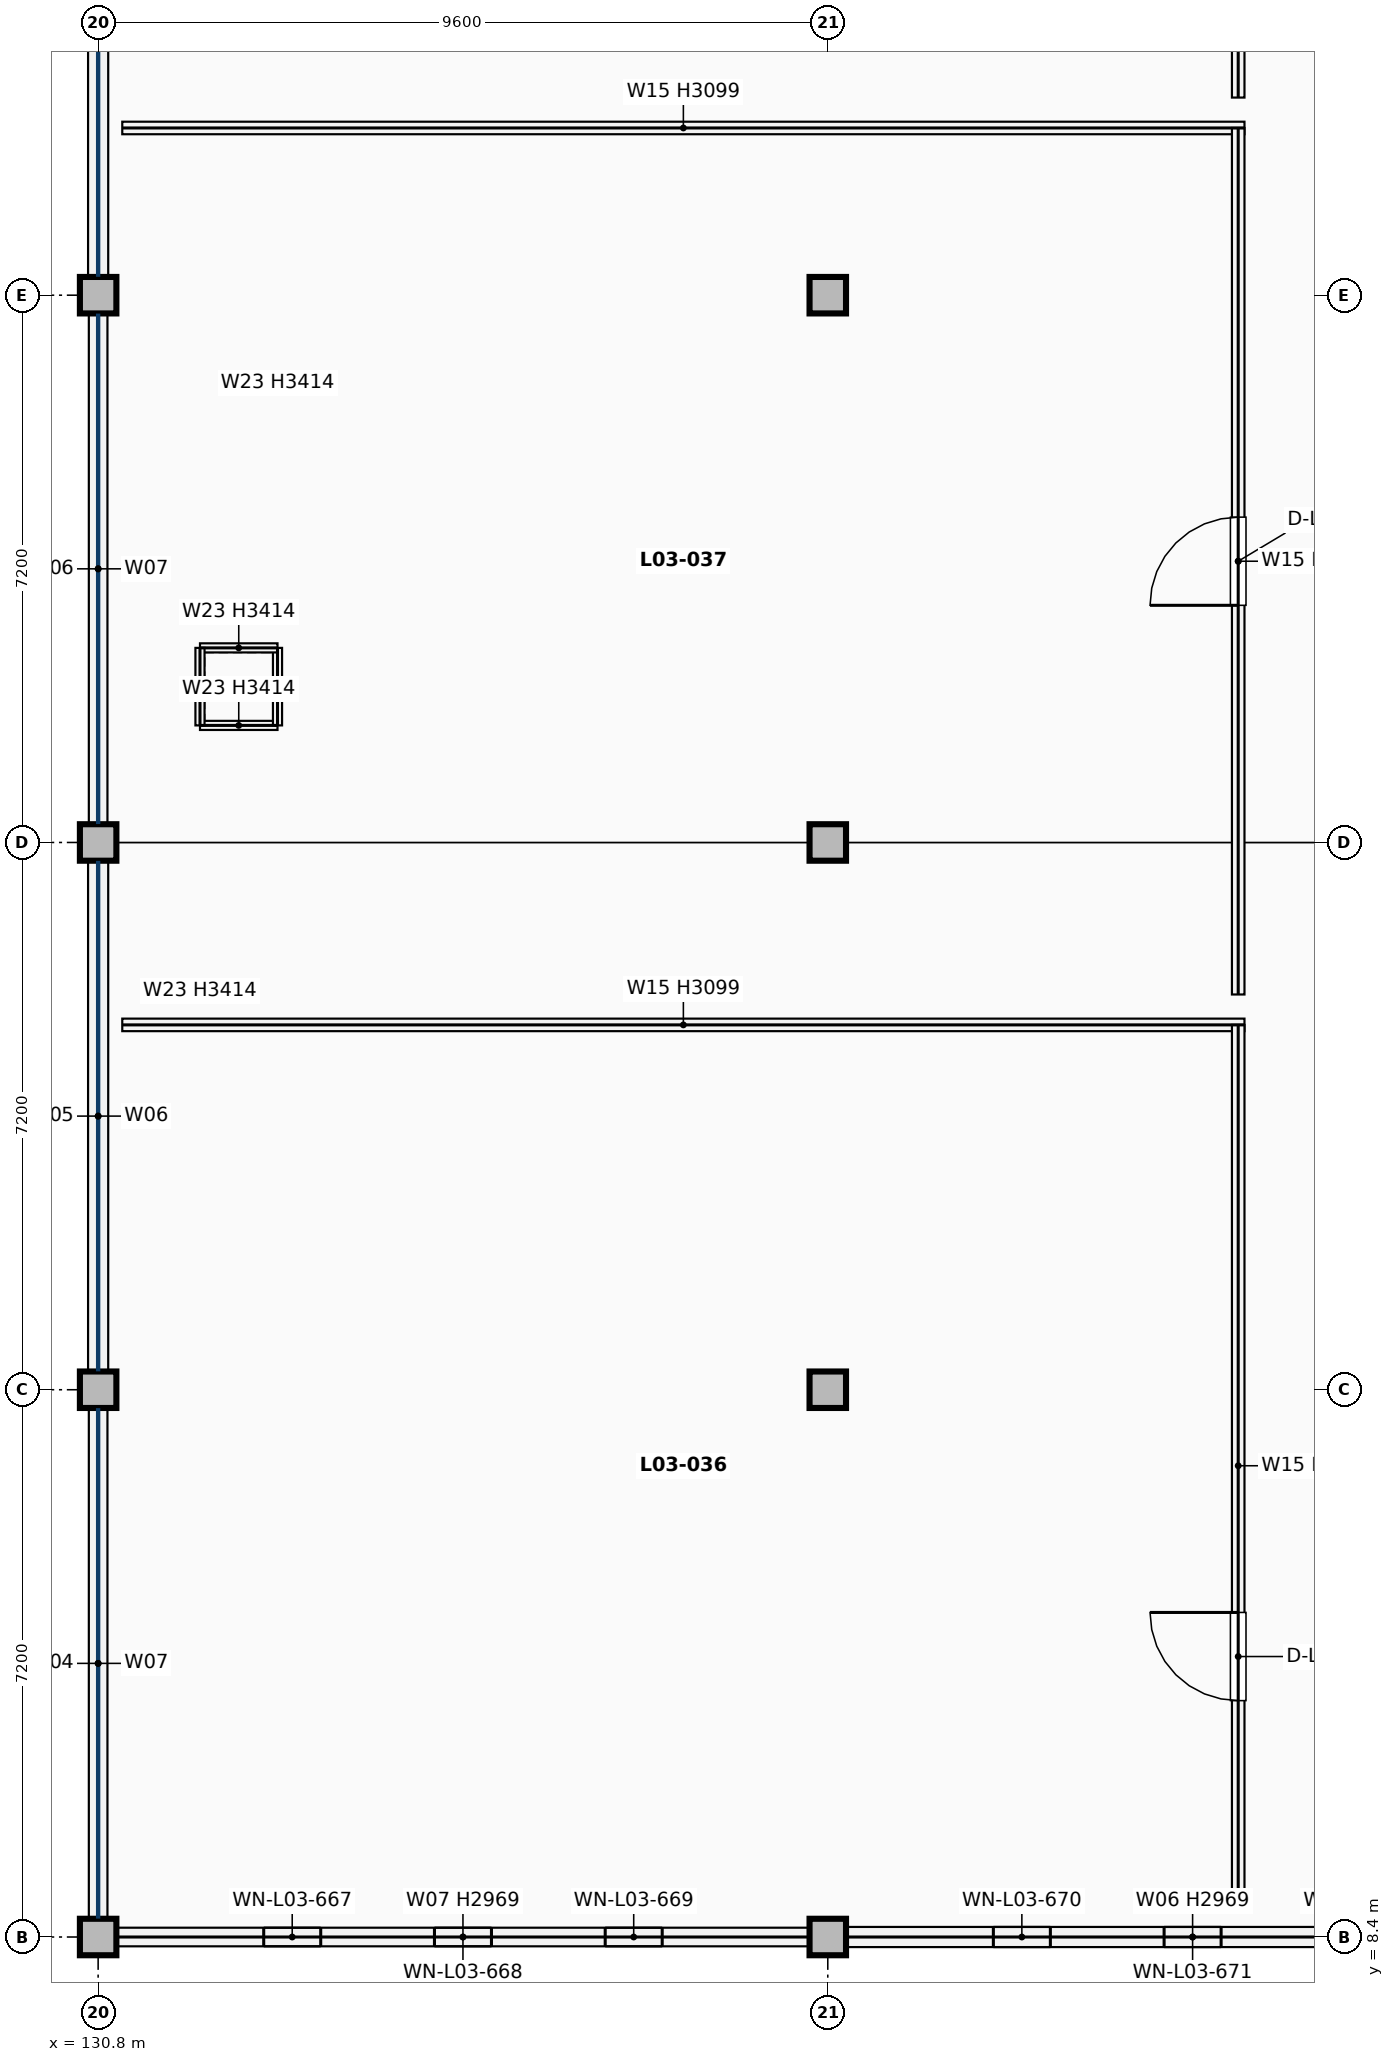
"""IFC4 building model, lengths in metres.
Left out: names, types, materials, properties, quantities, classifications, styles, units other than length and angle.
Written with IfcOpenShell. Run it as: python <this file> out.ifc"""

import sys

from ifc_helpers import new_model, si_unit, direction, frame, frame_2d, origin, origin_2d, place, context, subcontext, project, spatial, rectangle, extrude, element, fill, save


model = new_model("IFC4")
c1 = context("Model", 3, precision=1e-05, world=origin(), true_north=direction((0.0, 1.0)))
c2 = subcontext(c1, "Body", "Model", "MODEL_VIEW")
j1 = project(units=[si_unit("LENGTHUNIT", "METRE"), si_unit("PLANEANGLEUNIT", "RADIAN")], contexts=[c1])
p1 = place(None, origin())
s1 = spatial("IfcSite", under=j1, at=p1, CompositionType="ELEMENT")
p2 = place(p1, origin())
s2 = spatial("IfcBuilding", under=s1, at=p2, CompositionType="ELEMENT")
p3 = place(p2, frame((0.0, 0.0, 13.6)))
s3 = spatial("IfcBuildingStorey", under=s2, at=p3, CompositionType="ELEMENT", Elevation=13.6)
for number, where, z_axis, x_axis in (
    (1, (130.8, 8.4, 0.0), (0.0, 0.0, 1.0), (1.0, 0.0, 0.0)),
    (2, (130.8, 15.6, 0.0), (0.0, 0.0, 1.0), (1.0, 0.0, 0.0)),
    (3, (130.8, 22.8, 0.0), (0.0, 0.0, 1.0), (1.0, 0.0, 0.0)),
    (4, (130.8, 30.0, 0.0), (0.0, 0.0, 1.0), (1.0, 0.0, 0.0)),
    (5, (140.4, 8.4, 0.0), (0.0, 0.0, 1.0), (1.0, 0.0, 0.0)),
    (6, (140.4, 15.6, 0.0), (0.0, 0.0, 1.0), (1.0, 0.0, 0.0)),
    (7, (140.4, 22.8, 0.0), (0.0, 0.0, 1.0), (1.0, 0.0, 0.0)),
    (8, (140.4, 30.0, 0.0), (0.0, 0.0, 1.0), (1.0, 0.0, 0.0)),
):
    element("IfcColumn", number, at=place(p3, frame(where, z_axis=z_axis, x_axis=x_axis)), inside=s3, PredefinedType="COLUMN", context=c2, shape_type="SweptSolid", body=[
        extrude(rectangle(XDim=0.48, YDim=0.48, at=origin_2d()), origin(), (0.0, 0.0, 1.0), 3.74),
    ])
p4 = place(p3, frame((130.8, 8.642, 0.0), z_axis=(0.0, 0.0, 1.0), x_axis=(0.0, 1.0, 0.0)))
e9 = element("IfcWall", 9, at=p4, inside=s3, PredefinedType="SOLIDWALL", context=c2, shape_type="SweptSolid", body=[
    extrude(rectangle(XDim=6.716, YDim=0.245, at=frame_2d((3.358, 0.0))), origin(), (0.0, 0.0, 1.0), 0.85),
])
p5 = place(p3, frame((130.8, 15.842, 0.0), z_axis=(0.0, 0.0, 1.0), x_axis=(0.0, 1.0, 0.0)))
e10 = element("IfcWall", 10, at=p5, inside=s3, PredefinedType="SOLIDWALL", context=c2, shape_type="SweptSolid", body=[
    extrude(rectangle(XDim=6.716, YDim=0.265, at=frame_2d((3.358, 0.0))), origin(), (0.0, 0.0, 1.0), 0.85),
])
p6 = place(p3, frame((130.8, 23.042, 0.0), z_axis=(0.0, 0.0, 1.0), x_axis=(0.0, 1.0, 0.0)))
e11 = element("IfcWall", 11, at=p6, inside=s3, PredefinedType="SOLIDWALL", context=c2, shape_type="SweptSolid", body=[
    extrude(rectangle(XDim=6.716, YDim=0.245, at=frame_2d((3.358, 0.0))), origin(), (0.0, 0.0, 1.0), 0.85),
])
p7 = place(p3, frame((130.8, 30.242, 0.0), z_axis=(0.0, 0.0, 1.0), x_axis=(0.0, 1.0, 0.0)))
e12 = element("IfcWall", 12, at=p7, inside=s3, PredefinedType="SOLIDWALL", context=c2, shape_type="SweptSolid", body=[
    extrude(rectangle(XDim=6.716, YDim=0.265, at=frame_2d((3.358, 0.0))), origin(), (0.0, 0.0, 1.0), 0.85),
])
p8 = place(p3, frame((131.042, 8.4, 0.0), z_axis=(0.0, 0.0, 1.0), x_axis=(1.0, 0.0, 0.0)))
e13 = element("IfcWall", 13, at=p8, inside=s3, PredefinedType="SOLIDWALL", context=c2, shape_type="SweptSolid", body=[
    extrude(rectangle(XDim=9.116, YDim=0.245, at=frame_2d((4.558, 0.0))), origin(), (0.0, 0.0, 1.0), 2.969),
])
p9 = place(p8, frame((1.937, 0.0, 0.75)))
e14 = element("IfcOpeningElement", 14, at=p9, cuts=e13, PredefinedType="OPENING", context=c2, shape_type="SweptSolid", body=[
    extrude(rectangle(XDim=0.75, YDim=2.1, at=frame_2d((0.375, 1.05))), frame((0.0, 0.133, 0.0), z_axis=(0.0, -1.0, 0.0), x_axis=(1.0, 0.0, 0.0)), (0.0, 0.0, 1.0), 0.265),
])
p10 = place(p8, frame((4.183, 0.0, 0.75)))
e15 = element("IfcOpeningElement", 15, at=p10, cuts=e13, PredefinedType="OPENING", context=c2, shape_type="SweptSolid", body=[
    extrude(rectangle(XDim=0.75, YDim=2.1, at=frame_2d((0.375, 1.05))), frame((0.0, 0.133, 0.0), z_axis=(0.0, -1.0, 0.0), x_axis=(1.0, 0.0, 0.0)), (0.0, 0.0, 1.0), 0.265),
])
p11 = place(p8, frame((6.429, 0.0, 0.75)))
e16 = element("IfcOpeningElement", 16, at=p11, cuts=e13, PredefinedType="OPENING", context=c2, shape_type="SweptSolid", body=[
    extrude(rectangle(XDim=0.75, YDim=2.1, at=frame_2d((0.375, 1.05))), frame((0.0, 0.133, 0.0), z_axis=(0.0, -1.0, 0.0), x_axis=(1.0, 0.0, 0.0)), (0.0, 0.0, 1.0), 0.265),
])
p12 = place(p3, frame((140.642, 8.4, 0.0), z_axis=(0.0, 0.0, 1.0), x_axis=(1.0, 0.0, 0.0)))
e17 = element("IfcWall", 17, at=p12, inside=s3, PredefinedType="SOLIDWALL", context=c2, shape_type="SweptSolid", body=[
    extrude(rectangle(XDim=9.116, YDim=0.265, at=frame_2d((4.558, 0.0))), origin(), (0.0, 0.0, 1.0), 2.969),
])
p13 = place(p12, frame((1.937, 0.0, 0.75)))
e18 = element("IfcOpeningElement", 18, at=p13, cuts=e17, PredefinedType="OPENING", context=c2, shape_type="SweptSolid", body=[
    extrude(rectangle(XDim=0.75, YDim=1.5, at=frame_2d((0.375, 0.75))), frame((0.0, 0.143, 0.0), z_axis=(0.0, -1.0, 0.0), x_axis=(1.0, 0.0, 0.0)), (0.0, 0.0, 1.0), 0.285),
])
p14 = place(p12, frame((4.183, 0.0, 0.75)))
e19 = element("IfcOpeningElement", 19, at=p14, cuts=e17, PredefinedType="OPENING", context=c2, shape_type="SweptSolid", body=[
    extrude(rectangle(XDim=0.75, YDim=1.5, at=frame_2d((0.375, 0.75))), frame((0.0, 0.143, 0.0), z_axis=(0.0, -1.0, 0.0), x_axis=(1.0, 0.0, 0.0)), (0.0, 0.0, 1.0), 0.285),
])
p15 = place(p12, frame((6.429, 0.0, 0.75)))
e20 = element("IfcOpeningElement", 20, at=p15, cuts=e17, PredefinedType="OPENING", context=c2, shape_type="SweptSolid", body=[
    extrude(rectangle(XDim=0.75, YDim=1.5, at=frame_2d((0.375, 0.75))), frame((0.0, 0.143, 0.0), z_axis=(0.0, -1.0, 0.0), x_axis=(1.0, 0.0, 0.0)), (0.0, 0.0, 1.0), 0.285),
])
for number, where, z_axis, x_axis in (
    (21, (132.14, 24.34, 0.0), (0.0, 0.0, 1.0), (1.0, 0.0, 0.0)),
    (22, (133.16, 24.34, 0.0), (0.0, 0.0, 1.0), (0.0, 1.0, 0.0)),
    (23, (133.16, 25.36, 0.0), (0.0, 0.0, 1.0), (-1.0, 0.0, 0.0)),
    (24, (132.14, 25.36, 0.0), (0.0, 0.0, 1.0), (0.0, -1.0, 0.0)),
):
    element("IfcWall", number, at=place(p3, frame(where, z_axis=z_axis, x_axis=x_axis)), inside=s3, PredefinedType="PARTITIONING", context=c2, shape_type="SweptSolid", body=[
        extrude(rectangle(XDim=1.02, YDim=0.12, at=frame_2d((0.51, 0.0))), origin(), (0.0, 0.0, 1.0), 3.414),
    ])
p16 = place(p3, frame((131.117, 20.4, 0.0), z_axis=(0.0, 0.0, 1.0), x_axis=(1.0, 0.0, 0.0)))
e25 = element("IfcWall", 25, at=p16, inside=s3, PredefinedType="PARTITIONING", context=c2, shape_type="SweptSolid", body=[
    extrude(rectangle(XDim=14.765, YDim=0.165, at=frame_2d((7.383, 0.0))), origin(), (0.0, 0.0, 1.0), 3.099),
])
p17 = place(p3, frame((145.8, 8.8, 0.0), z_axis=(0.0, 0.0, 1.0), x_axis=(0.0, 1.0, 0.0)))
e26 = element("IfcWall", 26, at=p17, inside=s3, PredefinedType="PARTITIONING", context=c2, shape_type="SweptSolid", body=[
    extrude(rectangle(XDim=11.6, YDim=0.165, at=frame_2d((5.8, 0.0))), origin(), (0.0, 0.0, 1.0), 2.809),
])
p18 = place(p17, frame((2.71, 0.0, 0.0)))
e27 = element("IfcOpeningElement", 27, at=p18, cuts=e26, PredefinedType="OPENING", context=c2, shape_type="SweptSolid", body=[
    extrude(rectangle(XDim=1.16, YDim=2.22, at=frame_2d((0.58, 1.11))), frame((0.0, 0.093, 0.0), z_axis=(0.0, -1.0, 0.0), x_axis=(1.0, 0.0, 0.0)), (0.0, 0.0, 1.0), 0.185),
])
p19 = place(p3, frame((131.117, 32.2, 0.0), z_axis=(0.0, 0.0, 1.0), x_axis=(1.0, 0.0, 0.0)))
e28 = element("IfcWall", 28, at=p19, inside=s3, PredefinedType="PARTITIONING", context=c2, shape_type="SweptSolid", body=[
    extrude(rectangle(XDim=14.765, YDim=0.165, at=frame_2d((7.383, 0.0))), origin(), (0.0, 0.0, 1.0), 3.099),
])
p20 = place(p3, frame((145.8, 20.8, 0.0), z_axis=(0.0, 0.0, 1.0), x_axis=(0.0, 1.0, 0.0)))
e29 = element("IfcWall", 29, at=p20, inside=s3, PredefinedType="PARTITIONING", context=c2, shape_type="SweptSolid", body=[
    extrude(rectangle(XDim=11.4, YDim=0.165, at=frame_2d((5.7, 0.0))), origin(), (0.0, 0.0, 1.0), 2.809),
])
p21 = place(p20, frame((5.12, 0.0, 0.0)))
e30 = element("IfcOpeningElement", 30, at=p21, cuts=e29, PredefinedType="OPENING", context=c2, shape_type="SweptSolid", body=[
    extrude(rectangle(XDim=1.16, YDim=2.22, at=frame_2d((0.58, 1.11))), frame((0.0, 0.093, 0.0), z_axis=(0.0, -1.0, 0.0), x_axis=(1.0, 0.0, 0.0)), (0.0, 0.0, 1.0), 0.185),
])
p22 = place(p3, frame((145.8, 32.6, 0.0), z_axis=(0.0, 0.0, 1.0), x_axis=(0.0, 1.0, 0.0)))
e31 = element("IfcWall", 31, at=p22, inside=s3, PredefinedType="PARTITIONING", context=c2, shape_type="SweptSolid", body=[
    extrude(rectangle(XDim=11.4, YDim=0.165, at=frame_2d((5.7, 0.0))), origin(), (0.0, 0.0, 1.0), 2.809),
])
p23 = place(p22, frame((7.58, 0.0, 0.0)))
e32 = element("IfcOpeningElement", 32, at=p23, cuts=e31, PredefinedType="OPENING", context=c2, shape_type="SweptSolid", body=[
    extrude(rectangle(XDim=1.16, YDim=2.22, at=frame_2d((0.58, 1.11))), frame((0.0, 0.093, 0.0), z_axis=(0.0, -1.0, 0.0), x_axis=(1.0, 0.0, 0.0)), (0.0, 0.0, 1.0), 0.185),
])
p24 = place(p9, origin())
e33 = element("IfcWindow", 33, at=p24, inside=s3, PartitioningType="SINGLE_PANEL", PredefinedType="WINDOW", context=c2, shape_type="SweptSolid", body=[
    extrude(rectangle(XDim=0.75, YDim=2.1, at=frame_2d((0.375, 1.05))), frame((0.0, 0.03, 0.0), z_axis=(0.0, -1.0, 0.0), x_axis=(1.0, 0.0, 0.0)), (0.0, 0.0, 1.0), 0.06),
])
fill(e14, e33)
p25 = place(p10, origin())
e34 = element("IfcWindow", 34, at=p25, inside=s3, PartitioningType="SINGLE_PANEL", PredefinedType="WINDOW", context=c2, shape_type="SweptSolid", body=[
    extrude(rectangle(XDim=0.75, YDim=2.1, at=frame_2d((0.375, 1.05))), frame((0.0, 0.03, 0.0), z_axis=(0.0, -1.0, 0.0), x_axis=(1.0, 0.0, 0.0)), (0.0, 0.0, 1.0), 0.06),
])
fill(e15, e34)
p26 = place(p11, origin())
e35 = element("IfcWindow", 35, at=p26, inside=s3, PartitioningType="SINGLE_PANEL", PredefinedType="WINDOW", context=c2, shape_type="SweptSolid", body=[
    extrude(rectangle(XDim=0.75, YDim=2.1, at=frame_2d((0.375, 1.05))), frame((0.0, 0.03, 0.0), z_axis=(0.0, -1.0, 0.0), x_axis=(1.0, 0.0, 0.0)), (0.0, 0.0, 1.0), 0.06),
])
fill(e16, e35)
p27 = place(p13, origin())
e36 = element("IfcWindow", 36, at=p27, inside=s3, PartitioningType="SINGLE_PANEL", PredefinedType="WINDOW", context=c2, shape_type="SweptSolid", body=[
    extrude(rectangle(XDim=0.75, YDim=1.5, at=frame_2d((0.375, 0.75))), frame((0.0, 0.03, 0.0), z_axis=(0.0, -1.0, 0.0), x_axis=(1.0, 0.0, 0.0)), (0.0, 0.0, 1.0), 0.06),
])
fill(e18, e36)
p28 = place(p14, origin())
e37 = element("IfcWindow", 37, at=p28, inside=s3, PartitioningType="SINGLE_PANEL", PredefinedType="WINDOW", context=c2, shape_type="SweptSolid", body=[
    extrude(rectangle(XDim=0.75, YDim=1.5, at=frame_2d((0.375, 0.75))), frame((0.0, 0.03, 0.0), z_axis=(0.0, -1.0, 0.0), x_axis=(1.0, 0.0, 0.0)), (0.0, 0.0, 1.0), 0.06),
])
fill(e19, e37)
p29 = place(p18, origin())
e38 = element("IfcDoor", 38, at=p29, inside=s3, OperationType="SINGLE_SWING_RIGHT", PredefinedType="DOOR", context=c2, shape_type="SweptSolid", body=[
    extrude(rectangle(XDim=1.16, YDim=2.22, at=frame_2d((0.58, 1.11))), frame((0.0, 0.025, 0.0), z_axis=(0.0, -1.0, 0.0), x_axis=(1.0, 0.0, 0.0)), (0.0, 0.0, 1.0), 0.05),
])
fill(e27, e38)
p30 = place(p21, origin())
e39 = element("IfcDoor", 39, at=p30, inside=s3, OperationType="SINGLE_SWING_LEFT", PredefinedType="DOOR", context=c2, shape_type="SweptSolid", body=[
    extrude(rectangle(XDim=1.16, YDim=2.22, at=frame_2d((0.58, 1.11))), frame((0.0, 0.025, 0.0), z_axis=(0.0, -1.0, 0.0), x_axis=(1.0, 0.0, 0.0)), (0.0, 0.0, 1.0), 0.05),
])
fill(e30, e39)
save(model, sys.argv[1])
